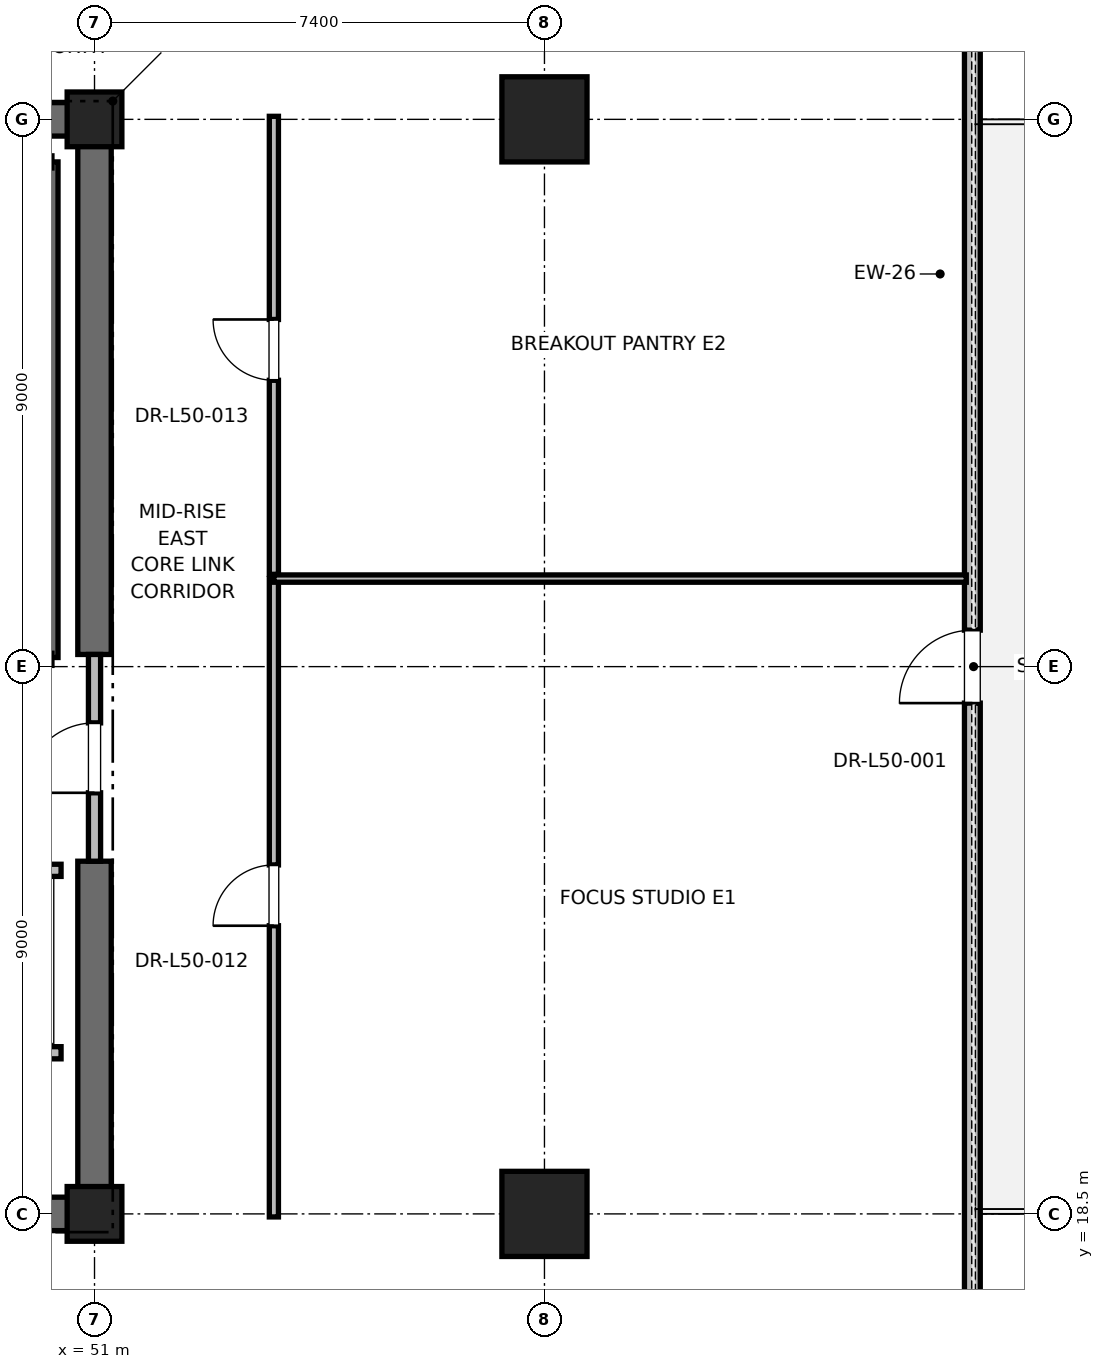
"""IFC4 building model, lengths in metres.
Left out: names, types, materials, properties, quantities, classifications, styles, units other than length and angle.
Written with IfcOpenShell. Run it as: python <this file> out.ifc"""

import sys

from ifc_helpers import new_model, si_unit, direction, frame, frame_2d, origin, origin_2d, place, context, subcontext, project, spatial, rectangle, extrude, element, fill, save


model = new_model("IFC4")
c1 = context("Model", 3, precision=1e-05, world=origin(), true_north=direction((0.0, 1.0)))
c2 = subcontext(c1, "Body", "Model", "MODEL_VIEW")
j1 = project(units=[si_unit("LENGTHUNIT", "METRE"), si_unit("PLANEANGLEUNIT", "RADIAN")], contexts=[c1])
p1 = place(None, origin())
s1 = spatial("IfcSite", under=j1, at=p1, CompositionType="ELEMENT")
p2 = place(p1, origin())
s2 = spatial("IfcBuilding", under=s1, at=p2, CompositionType="ELEMENT")
p3 = place(p2, frame((0.0, 0.0, 217.2)))
s3 = spatial("IfcBuildingStorey", under=s2, at=p3, CompositionType="ELEMENT", Elevation=217.2)
for number, where, z_axis, x_axis in (
    (1, (58.4, 18.5, 0.0), (0.0, 0.0, 1.0), (1.0, 0.0, 0.0)),
    (2, (58.4, 36.5, 0.0), (0.0, 0.0, 1.0), (1.0, 0.0, 0.0)),
):
    element("IfcColumn", number, at=place(p3, frame(where, z_axis=z_axis, x_axis=x_axis)), inside=s3, PredefinedType="COLUMN", context=c2, shape_type="SweptSolid", body=[
        extrude(rectangle(XDim=1.4, YDim=1.4, at=origin_2d()), origin(), (0.0, 0.0, 1.0), 4.0),
    ])
for number, where, z_axis, x_axis in (
    (3, (51.0, 18.5, 0.0), (0.0, 0.0, 1.0), (1.0, 0.0, 0.0)),
    (4, (51.0, 36.5, 0.0), (0.0, 0.0, 1.0), (1.0, 0.0, 0.0)),
):
    element("IfcColumn", number, at=place(p3, frame(where, z_axis=z_axis, x_axis=x_axis)), inside=s3, PredefinedType="PILASTER", context=c2, shape_type="SweptSolid", body=[
        extrude(rectangle(XDim=0.9, YDim=0.9, at=origin_2d()), origin(), (0.0, 0.0, 1.0), 4.0),
    ])
p4 = place(p3, frame((41.8, 18.5, 0.0), z_axis=(0.0, 0.0, 1.0), x_axis=(1.0, 0.0, 0.0)))
e5 = element("IfcWall", 5, at=p4, inside=s3, PredefinedType="SHEAR", context=c2, shape_type="SweptSolid", body=[
    extrude(rectangle(XDim=9.2, YDim=0.55, at=frame_2d((4.6, 0.0))), origin(), (0.0, 0.0, 1.0), 3.775),
])
for number, where, z_axis, x_axis in (
    (6, (45.2, 36.5, 0.0), (0.0, 0.0, 1.0), (1.0, 0.0, 0.0)),
    (7, (51.0, 18.5, 0.0), (0.0, 0.0, 1.0), (0.0, 1.0, 0.0)),
):
    element("IfcWall", number, at=place(p3, frame(where, z_axis=z_axis, x_axis=x_axis)), inside=s3, PredefinedType="SHEAR", context=c2, shape_type="SweptSolid", body=[
        extrude(rectangle(XDim=5.8, YDim=0.55, at=frame_2d((2.9, 0.0))), origin(), (0.0, 0.0, 1.0), 3.775),
    ])
p5 = place(p3, frame((51.0, 27.7, 0.0), z_axis=(0.0, 0.0, 1.0), x_axis=(0.0, 1.0, 0.0)))
e8 = element("IfcWall", 8, at=p5, inside=s3, PredefinedType="SHEAR", context=c2, shape_type="SweptSolid", body=[
    extrude(rectangle(XDim=8.8, YDim=0.55, at=frame_2d((4.4, 0.0))), origin(), (0.0, 0.0, 1.0), 3.775),
])
p6 = place(p3, frame((65.438, 8.986, 0.0), z_axis=(0.0, 0.0, 1.0), x_axis=(0.0, 1.0, 0.0)))
e9 = element("IfcWall", 9, at=p6, inside=s3, PredefinedType="PARAPET", context=c2, shape_type="SweptSolid", body=[
    extrude(rectangle(XDim=37.029, YDim=0.26, at=frame_2d((18.514, 0.0))), origin(), (0.0, 0.0, 1.0), 3.047),
])
p7 = place(p6, frame((4.2, 0.0, 0.85)))
e10 = element("IfcOpeningElement", 10, at=p7, cuts=e9, PredefinedType="OPENING", context=c2, shape_type="SweptSolid", body=[
    extrude(rectangle(XDim=2.0, YDim=2.3, at=frame_2d((1.0, 1.15))), frame((0.0, 0.13, 0.0), z_axis=(0.0, -1.0, 0.0), x_axis=(1.0, 0.0, 0.0)), (0.0, 0.0, 1.0), 0.26),
])
p8 = place(p6, frame((17.914, 0.0, 0.0)))
e11 = element("IfcOpeningElement", 11, at=p8, cuts=e9, PredefinedType="OPENING", context=c2, shape_type="SweptSolid", body=[
    extrude(rectangle(XDim=1.2, YDim=2.2, at=frame_2d((0.6, 1.1))), frame((0.0, 0.13, 0.0), z_axis=(0.0, -1.0, 0.0), x_axis=(1.0, 0.0, 0.0)), (0.0, 0.0, 1.0), 0.26),
])
p9 = place(p6, frame((30.829, 0.0, 0.85)))
e12 = element("IfcOpeningElement", 12, at=p9, cuts=e9, PredefinedType="OPENING", context=c2, shape_type="SweptSolid", body=[
    extrude(rectangle(XDim=2.0, YDim=2.3, at=frame_2d((1.0, 1.15))), frame((0.0, 0.13, 0.0), z_axis=(0.0, -1.0, 0.0), x_axis=(1.0, 0.0, 0.0)), (0.0, 0.0, 1.0), 0.26),
])
p10 = place(p3, frame((50.3, 27.65, 0.0), z_axis=(0.0, 0.0, 1.0), x_axis=(0.0, 1.0, 0.0)))
e13 = element("IfcWall", 13, at=p10, inside=s3, PredefinedType="SOLIDWALL", context=c2, shape_type="SweptSolid", body=[
    extrude(rectangle(XDim=8.15, YDim=0.2, at=frame_2d((4.075, 0.0))), origin(), (0.0, 0.0, 1.0), 3.775),
])
p11 = place(p3, frame((51.0, 24.3, 0.0), z_axis=(0.0, 0.0, 1.0), x_axis=(0.0, 1.0, 0.0)))
e14 = element("IfcWall", 14, at=p11, inside=s3, PredefinedType="PARTITIONING", context=c2, shape_type="SweptSolid", body=[
    extrude(rectangle(XDim=3.4, YDim=0.2, at=frame_2d((1.7, 0.0))), origin(), (0.0, 0.0, 1.0), 2.755),
])
p12 = place(p11, frame((1.125, 0.0, 0.0)))
e15 = element("IfcOpeningElement", 15, at=p12, cuts=e14, PredefinedType="OPENING", context=c2, shape_type="SweptSolid", body=[
    extrude(rectangle(XDim=1.15, YDim=2.2, at=frame_2d((0.575, 1.1))), frame((0.0, 0.1, 0.0), z_axis=(0.0, -1.0, 0.0), x_axis=(1.0, 0.0, 0.0)), (0.0, 0.0, 1.0), 0.2),
])
p13 = place(p3, frame((47.85, 21.15, 0.0), z_axis=(0.0, 0.0, 1.0), x_axis=(1.0, 0.0, 0.0)))
e16 = element("IfcWall", 16, at=p13, inside=s3, PredefinedType="SOLIDWALL", context=c2, shape_type="SweptSolid", body=[
    extrude(rectangle(XDim=2.6, YDim=0.2, at=frame_2d((1.3, 0.0))), origin(), (0.0, 0.0, 1.0), 3.775),
])
p14 = place(p3, frame((50.45, 24.15, 0.0), z_axis=(0.0, 0.0, 1.0), x_axis=(-1.0, 0.0, 0.0)))
e17 = element("IfcWall", 17, at=p14, inside=s3, PredefinedType="SOLIDWALL", context=c2, shape_type="SweptSolid", body=[
    extrude(rectangle(XDim=2.6, YDim=0.2, at=frame_2d((1.3, 0.0))), origin(), (0.0, 0.0, 1.0), 2.755),
])
p15 = place(p14, frame((0.75, 0.0, 0.0)))
e18 = element("IfcOpeningElement", 18, at=p15, cuts=e17, PredefinedType="OPENING", context=c2, shape_type="SweptSolid", body=[
    extrude(rectangle(XDim=1.1, YDim=2.2, at=frame_2d((0.55, 1.1))), frame((0.0, 0.1, 0.0), z_axis=(0.0, -1.0, 0.0), x_axis=(1.0, 0.0, 0.0)), (0.0, 0.0, 1.0), 0.2),
])
p16 = place(p3, frame((53.95, 18.45, 0.0), z_axis=(0.0, 0.0, 1.0), x_axis=(0.0, 1.0, 0.0)))
e19 = element("IfcWall", 19, at=p16, inside=s3, PredefinedType="PARTITIONING", context=c2, shape_type="SweptSolid", body=[
    extrude(rectangle(XDim=10.498, YDim=0.15, at=frame_2d((5.249, 0.0))), origin(), (0.0, 0.0, 1.0), 2.85),
])
p17 = place(p16, frame((4.789, 0.0, 0.0)))
e20 = element("IfcOpeningElement", 20, at=p17, cuts=e19, PredefinedType="OPENING", context=c2, shape_type="SweptSolid", body=[
    extrude(rectangle(XDim=1.0, YDim=2.15, at=frame_2d((0.5, 1.075))), frame((0.0, 0.075, 0.0), z_axis=(0.0, -1.0, 0.0), x_axis=(1.0, 0.0, 0.0)), (0.0, 0.0, 1.0), 0.15),
])
p18 = place(p3, frame((53.95, 28.948, 0.0), z_axis=(0.0, 0.0, 1.0), x_axis=(1.0, 0.0, 0.0)))
e21 = element("IfcWall", 21, at=p18, inside=s3, PredefinedType="PARTITIONING", context=c2, shape_type="SweptSolid", body=[
    extrude(rectangle(XDim=11.387, YDim=0.12, at=frame_2d((5.694, 0.0))), origin(), (0.0, 0.0, 1.0), 2.85),
])
p19 = place(p3, frame((53.95, 29.018, 0.0), z_axis=(0.0, 0.0, 1.0), x_axis=(0.0, 1.0, 0.0)))
e22 = element("IfcWall", 22, at=p19, inside=s3, PredefinedType="PARTITIONING", context=c2, shape_type="SweptSolid", body=[
    extrude(rectangle(XDim=7.532, YDim=0.15, at=frame_2d((3.766, 0.0))), origin(), (0.0, 0.0, 1.0), 2.85),
])
p20 = place(p19, frame((3.191, 0.0, 0.0)))
e23 = element("IfcOpeningElement", 23, at=p20, cuts=e22, PredefinedType="OPENING", context=c2, shape_type="SweptSolid", body=[
    extrude(rectangle(XDim=1.0, YDim=2.15, at=frame_2d((0.5, 1.075))), frame((0.0, 0.075, 0.0), z_axis=(0.0, -1.0, 0.0), x_axis=(1.0, 0.0, 0.0)), (0.0, 0.0, 1.0), 0.15),
])
p21 = place(p8, origin())
e24 = element("IfcDoor", 24, at=p21, inside=s3, OperationType="SINGLE_SWING_LEFT", PredefinedType="DOOR", context=c2, shape_type="SweptSolid", body=[
    extrude(rectangle(XDim=1.2, YDim=2.2, at=frame_2d((0.6, 1.1))), frame((0.0, 0.025, 0.0), z_axis=(0.0, -1.0, 0.0), x_axis=(1.0, 0.0, 0.0)), (0.0, 0.0, 1.0), 0.05),
])
fill(e11, e24)
p22 = place(p12, origin())
e25 = element("IfcDoor", 25, at=p22, inside=s3, OperationType="SINGLE_SWING_LEFT", PredefinedType="DOOR", context=c2, shape_type="SweptSolid", body=[
    extrude(rectangle(XDim=1.15, YDim=2.2, at=frame_2d((0.575, 1.1))), frame((0.0, 0.025, 0.0), z_axis=(0.0, -1.0, 0.0), x_axis=(1.0, 0.0, 0.0)), (0.0, 0.0, 1.0), 0.05),
])
fill(e15, e25)
p23 = place(p17, origin())
e26 = element("IfcDoor", 26, at=p23, inside=s3, OperationType="SINGLE_SWING_LEFT", PredefinedType="DOOR", context=c2, shape_type="SweptSolid", body=[
    extrude(rectangle(XDim=1.0, YDim=2.15, at=frame_2d((0.5, 1.075))), frame((0.0, 0.025, 0.0), z_axis=(0.0, -1.0, 0.0), x_axis=(1.0, 0.0, 0.0)), (0.0, 0.0, 1.0), 0.05),
])
fill(e20, e26)
p24 = place(p20, origin())
e27 = element("IfcDoor", 27, at=p24, inside=s3, OperationType="SINGLE_SWING_RIGHT", PredefinedType="DOOR", context=c2, shape_type="SweptSolid", body=[
    extrude(rectangle(XDim=1.0, YDim=2.15, at=frame_2d((0.5, 1.075))), frame((0.0, 0.025, 0.0), z_axis=(0.0, -1.0, 0.0), x_axis=(1.0, 0.0, 0.0)), (0.0, 0.0, 1.0), 0.05),
])
fill(e23, e27)
save(model, sys.argv[1])
